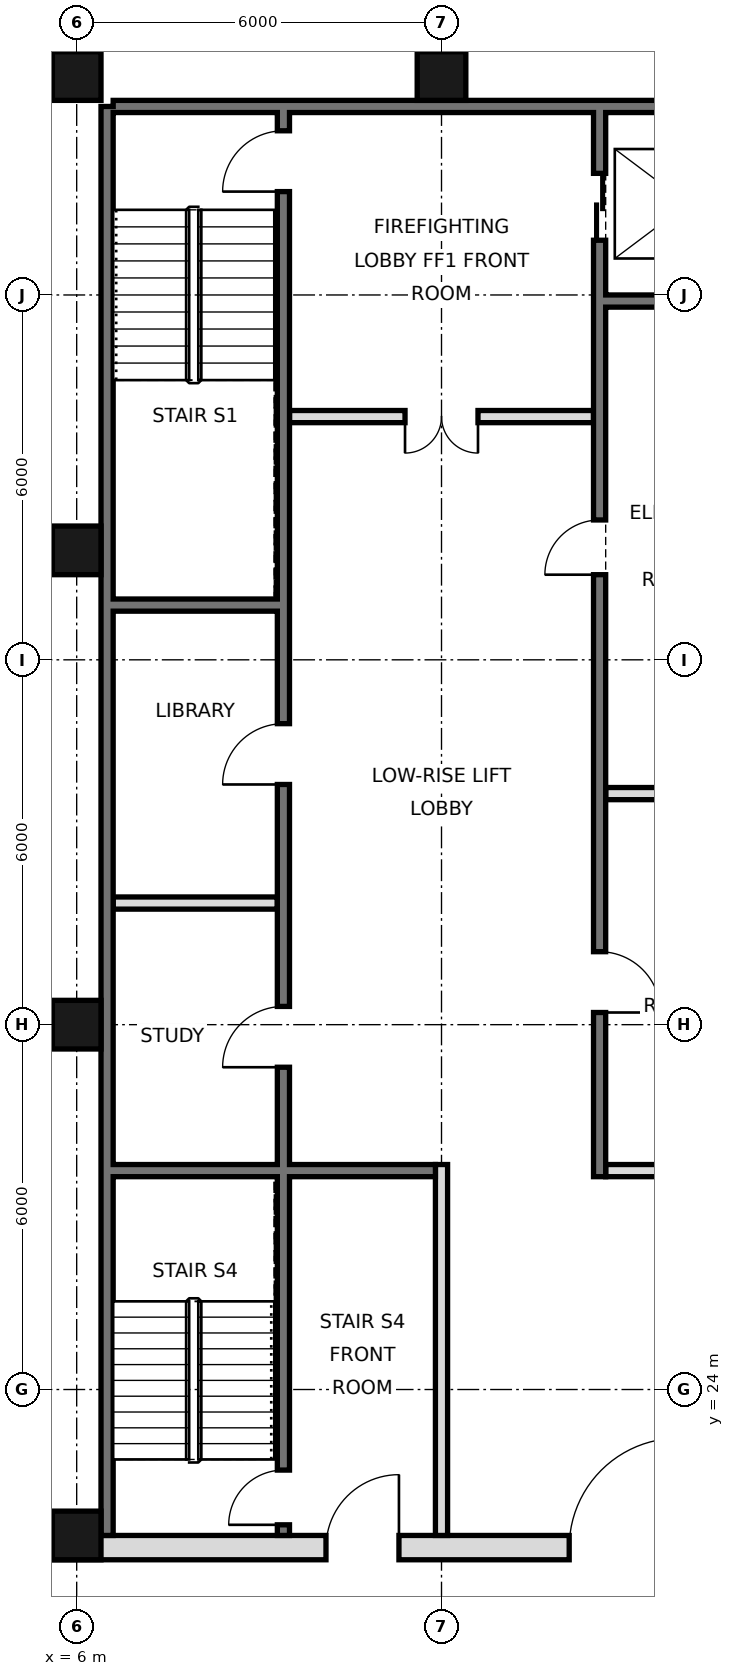
"""IFC4 building model, lengths in metres.
Left out: names, types, materials, properties, quantities, classifications, styles, units other than length and angle.
Written with IfcOpenShell. Run it as: python <this file> out.ifc"""

import sys

from ifc_helpers import new_model, si_unit, direction, frame, frame_2d, origin, origin_2d, place, context, subcontext, project, spatial, rectangle, hollow_rectangle, extrude, element, fill, save


model = new_model("IFC4")
c1 = context("Model", 3, precision=1e-05, world=origin(), true_north=direction((0.0, 1.0)))
c2 = subcontext(c1, "Body", "Model", "MODEL_VIEW")
j1 = project(units=[si_unit("LENGTHUNIT", "METRE"), si_unit("PLANEANGLEUNIT", "RADIAN")], contexts=[c1])
p1 = place(None, origin())
s1 = spatial("IfcSite", under=j1, at=p1, CompositionType="ELEMENT")
p2 = place(p1, origin())
s2 = spatial("IfcBuilding", under=s1, at=p2, CompositionType="ELEMENT")
p3 = place(p2, frame((0.0, 0.0, 219.0)))
s3 = spatial("IfcBuildingStorey", under=s2, at=p3, CompositionType="ELEMENT", Elevation=219.0)
for number, where, z_axis, x_axis in (
    (1, (6.0, 21.6, 0.0), (0.0, 0.0, 1.0), (1.0, 0.0, 0.0)),
    (2, (6.0, 30.0, 0.0), (0.0, 0.0, 1.0), (1.0, 0.0, 0.0)),
    (3, (6.0, 37.8, 0.0), (0.0, 0.0, 1.0), (1.0, 0.0, 0.0)),
    (4, (6.0, 45.6, 0.0), (0.0, 0.0, 1.0), (1.0, 0.0, 0.0)),
    (5, (12.0, 45.6, 0.0), (0.0, 0.0, 1.0), (1.0, 0.0, 0.0)),
):
    element("IfcColumn", number, at=place(p3, frame(where, z_axis=z_axis, x_axis=x_axis)), inside=s3, PredefinedType="COLUMN", context=c2, shape_type="SweptSolid", body=[
        extrude(hollow_rectangle(XDim=0.8, YDim=0.8, WallThickness=0.04, at=origin_2d()), origin(), (0.0, 0.0, 1.0), 3.6),
    ])
p4 = place(p3, frame((6.5, 21.6, 0.0), z_axis=(0.0, 0.0, 1.0), x_axis=(0.0, 1.0, 0.0)))
e6 = element("IfcWall", 6, at=p4, inside=s3, PredefinedType="SOLIDWALL", context=c2, shape_type="SweptSolid", body=[
    extrude(rectangle(XDim=23.5, YDim=0.2, at=frame_2d((11.75, 0.0))), origin(), (0.0, 0.0, 1.0), 3.42),
])
p5 = place(p3, frame((6.6, 45.1, 0.0), z_axis=(0.0, 0.0, 1.0), x_axis=(1.0, 0.0, 0.0)))
e7 = element("IfcWall", 7, at=p5, inside=s3, PredefinedType="SOLIDWALL", context=c2, shape_type="SweptSolid", body=[
    extrude(rectangle(XDim=34.8, YDim=0.2, at=frame_2d((17.4, 0.0))), origin(), (0.0, 0.0, 1.0), 3.42),
])
p6 = place(p3, frame((5.6, 21.4, 0.0), z_axis=(0.0, 0.0, 1.0), x_axis=(1.0, 0.0, 0.0)))
e8 = element("IfcWall", 8, at=p6, inside=s3, PredefinedType="SOLIDWALL", context=c2, shape_type="SweptSolid", body=[
    extrude(rectangle(XDim=36.8, YDim=0.4, at=frame_2d((18.4, 0.0))), origin(), (0.0, 0.0, 1.0), 3.42),
])
p7 = place(p6, frame((8.5, 0.0, 0.0)))
e9 = element("IfcOpeningElement", 9, at=p7, cuts=e8, PredefinedType="OPENING", context=c2, shape_type="SweptSolid", body=[
    extrude(rectangle(XDim=1.8, YDim=2.1, at=frame_2d((0.9, 1.05))), frame((0.0, 0.21, 0.0), z_axis=(0.0, -1.0, 0.0), x_axis=(1.0, 0.0, 0.0)), (0.0, 0.0, 1.0), 0.42),
])
p8 = place(p6, frame((17.5, 0.0, 0.0)))
e10 = element("IfcOpeningElement", 10, at=p8, cuts=e8, PredefinedType="OPENING", context=c2, shape_type="SweptSolid", body=[
    extrude(rectangle(XDim=1.8, YDim=2.1, at=frame_2d((0.9, 1.05))), frame((0.0, 0.21, 0.0), z_axis=(0.0, -1.0, 0.0), x_axis=(1.0, 0.0, 0.0)), (0.0, 0.0, 1.0), 0.42),
])
p9 = place(p6, frame((26.5, 0.0, 0.0)))
e11 = element("IfcOpeningElement", 11, at=p9, cuts=e8, PredefinedType="OPENING", context=c2, shape_type="SweptSolid", body=[
    extrude(rectangle(XDim=1.8, YDim=2.1, at=frame_2d((0.9, 1.05))), frame((0.0, 0.21, 0.0), z_axis=(0.0, -1.0, 0.0), x_axis=(1.0, 0.0, 0.0)), (0.0, 0.0, 1.0), 0.42),
])
p10 = place(p6, frame((4.5, 0.0, 0.0)))
e12 = element("IfcOpeningElement", 12, at=p10, cuts=e8, PredefinedType="OPENING", context=c2, shape_type="SweptSolid", body=[
    extrude(rectangle(XDim=1.2, YDim=2.1, at=frame_2d((0.6, 1.05))), frame((0.0, 0.21, 0.0), z_axis=(0.0, -1.0, 0.0), x_axis=(1.0, 0.0, 0.0)), (0.0, 0.0, 1.0), 0.42),
])
p11 = place(p6, frame((31.1, 0.0, 0.0)))
e13 = element("IfcOpeningElement", 13, at=p11, cuts=e8, PredefinedType="OPENING", context=c2, shape_type="SweptSolid", body=[
    extrude(rectangle(XDim=1.2, YDim=2.1, at=frame_2d((0.6, 1.05))), frame((0.0, 0.21, 0.0), z_axis=(0.0, -1.0, 0.0), x_axis=(1.0, 0.0, 0.0)), (0.0, 0.0, 1.0), 0.42),
])
p12 = place(p3, frame((12.0, 21.6, 0.0), z_axis=(0.0, 0.0, 1.0), x_axis=(0.0, 1.0, 0.0)))
e14 = element("IfcWall", 14, at=p12, inside=s3, PredefinedType="PARTITIONING", context=c2, shape_type="SweptSolid", body=[
    extrude(rectangle(XDim=6.1, YDim=0.2, at=frame_2d((3.05, 0.0))), origin(), (0.0, 0.0, 1.0), 3.42),
])
p13 = place(p3, frame((14.6, 27.5, 0.0), z_axis=(0.0, 0.0, 1.0), x_axis=(0.0, 1.0, 0.0)))
e15 = element("IfcWall", 15, at=p13, inside=s3, PredefinedType="SOLIDWALL", context=c2, shape_type="SweptSolid", body=[
    extrude(rectangle(XDim=17.5, YDim=0.2, at=frame_2d((8.75, 0.0))), origin(), (0.0, 0.0, 1.0), 3.42),
])
p14 = place(p13, frame((15.4, 0.0, 0.0)))
e16 = element("IfcOpeningElement", 16, at=p14, cuts=e15, PredefinedType="OPENING", context=c2, shape_type="SweptSolid", body=[
    extrude(rectangle(XDim=1.1, YDim=2.1, at=frame_2d((0.55, 1.05))), frame((0.0, 0.11, 0.0), z_axis=(0.0, -1.0, 0.0), x_axis=(1.0, 0.0, 0.0)), (0.0, 0.0, 1.0), 0.22),
])
p15 = place(p13, frame((2.7, 0.0, 0.0)))
e17 = element("IfcOpeningElement", 17, at=p15, cuts=e15, PredefinedType="OPENING", context=c2, shape_type="SweptSolid", body=[
    extrude(rectangle(XDim=1.0, YDim=2.1, at=frame_2d((0.5, 1.05))), frame((0.0, 0.11, 0.0), z_axis=(0.0, -1.0, 0.0), x_axis=(1.0, 0.0, 0.0)), (0.0, 0.0, 1.0), 0.22),
])
p16 = place(p13, frame((9.9, 0.0, 0.0)))
e18 = element("IfcOpeningElement", 18, at=p16, cuts=e15, PredefinedType="OPENING", context=c2, shape_type="SweptSolid", body=[
    extrude(rectangle(XDim=0.9, YDim=2.1, at=frame_2d((0.45, 1.05))), frame((0.0, 0.11, 0.0), z_axis=(0.0, -1.0, 0.0), x_axis=(1.0, 0.0, 0.0)), (0.0, 0.0, 1.0), 0.22),
])
p17 = place(p3, frame((9.4, 21.6, 0.0), z_axis=(0.0, 0.0, 1.0), x_axis=(0.0, 1.0, 0.0)))
e19 = element("IfcWall", 19, at=p17, inside=s3, PredefinedType="SOLIDWALL", context=c2, shape_type="SweptSolid", body=[
    extrude(rectangle(XDim=23.4, YDim=0.2, at=frame_2d((11.7, 0.0))), origin(), (0.0, 0.0, 1.0), 3.42),
])
p18 = place(p17, frame((7.7, 0.0, 0.0)))
e20 = element("IfcOpeningElement", 20, at=p18, cuts=e19, PredefinedType="OPENING", context=c2, shape_type="SweptSolid", body=[
    extrude(rectangle(XDim=1.0, YDim=2.1, at=frame_2d((0.5, 1.05))), frame((0.0, 0.11, 0.0), z_axis=(0.0, -1.0, 0.0), x_axis=(1.0, 0.0, 0.0)), (0.0, 0.0, 1.0), 0.22),
])
p19 = place(p17, frame((12.35, 0.0, 0.0)))
e21 = element("IfcOpeningElement", 21, at=p19, cuts=e19, PredefinedType="OPENING", context=c2, shape_type="SweptSolid", body=[
    extrude(rectangle(XDim=1.0, YDim=2.1, at=frame_2d((0.5, 1.05))), frame((0.0, 0.11, 0.0), z_axis=(0.0, -1.0, 0.0), x_axis=(1.0, 0.0, 0.0)), (0.0, 0.0, 1.0), 0.22),
])
p20 = place(p17, frame((22.1, 0.0, 0.0)))
e22 = element("IfcOpeningElement", 22, at=p20, cuts=e19, PredefinedType="OPENING", context=c2, shape_type="SweptSolid", body=[
    extrude(rectangle(XDim=1.0, YDim=2.1, at=frame_2d((0.5, 1.05))), frame((0.0, 0.11, 0.0), z_axis=(0.0, -1.0, 0.0), x_axis=(1.0, 0.0, 0.0)), (0.0, 0.0, 1.0), 0.22),
])
p21 = place(p17, frame((0.175, 0.0, 0.0)))
e23 = element("IfcOpeningElement", 23, at=p21, cuts=e19, PredefinedType="OPENING", context=c2, shape_type="SweptSolid", body=[
    extrude(rectangle(XDim=0.9, YDim=2.1, at=frame_2d((0.45, 1.05))), frame((0.0, 0.11, 0.0), z_axis=(0.0, -1.0, 0.0), x_axis=(1.0, 0.0, 0.0)), (0.0, 0.0, 1.0), 0.22),
])
p22 = place(p3, frame((14.7, 27.6, 0.0), z_axis=(0.0, 0.0, 1.0), x_axis=(1.0, 0.0, 0.0)))
e24 = element("IfcWall", 24, at=p22, inside=s3, PredefinedType="PARTITIONING", context=c2, shape_type="SweptSolid", body=[
    extrude(rectangle(XDim=2.7, YDim=0.2, at=frame_2d((1.35, 0.0))), origin(), (0.0, 0.0, 1.0), 3.42),
])
p23 = place(p3, frame((6.6, 27.6, 0.0), z_axis=(0.0, 0.0, 1.0), x_axis=(1.0, 0.0, 0.0)))
e25 = element("IfcWall", 25, at=p23, inside=s3, PredefinedType="SOLIDWALL", context=c2, shape_type="SweptSolid", body=[
    extrude(rectangle(XDim=5.3, YDim=0.2, at=frame_2d((2.65, 0.0))), origin(), (0.0, 0.0, 1.0), 3.42),
])
p24 = place(p3, frame((6.6, 32.0, 0.0), z_axis=(0.0, 0.0, 1.0), x_axis=(1.0, 0.0, 0.0)))
e26 = element("IfcWall", 26, at=p24, inside=s3, PredefinedType="PARTITIONING", context=c2, shape_type="SweptSolid", body=[
    extrude(rectangle(XDim=2.7, YDim=0.2, at=frame_2d((1.35, 0.0))), origin(), (0.0, 0.0, 1.0), 3.42),
])
for number, where, z_axis, x_axis in (
    (27, (14.7, 33.8, 0.0), (0.0, 0.0, 1.0), (1.0, 0.0, 0.0)),
    (28, (6.6, 36.9, 0.0), (0.0, 0.0, 1.0), (1.0, 0.0, 0.0)),
):
    element("IfcWall", number, at=place(p3, frame(where, z_axis=z_axis, x_axis=x_axis)), inside=s3, PredefinedType="SOLIDWALL", context=c2, shape_type="SweptSolid", body=[
        extrude(rectangle(XDim=2.7, YDim=0.2, at=frame_2d((1.35, 0.0))), origin(), (0.0, 0.0, 1.0), 3.42),
    ])
p25 = place(p3, frame((9.5, 40.0, 0.0), z_axis=(0.0, 0.0, 1.0), x_axis=(1.0, 0.0, 0.0)))
e29 = element("IfcWall", 29, at=p25, inside=s3, PredefinedType="PARTITIONING", context=c2, shape_type="SweptSolid", body=[
    extrude(rectangle(XDim=5.0, YDim=0.2, at=frame_2d((2.5, 0.0))), origin(), (0.0, 0.0, 1.0), 3.42),
])
p26 = place(p25, frame((1.9, 0.0, 0.0)))
e30 = element("IfcOpeningElement", 30, at=p26, cuts=e29, PredefinedType="OPENING", context=c2, shape_type="SweptSolid", body=[
    extrude(rectangle(XDim=1.2, YDim=2.1, at=frame_2d((0.6, 1.05))), frame((0.0, 0.11, 0.0), z_axis=(0.0, -1.0, 0.0), x_axis=(1.0, 0.0, 0.0)), (0.0, 0.0, 1.0), 0.22),
])
p27 = place(p3, frame((14.7, 41.9, 0.0), z_axis=(0.0, 0.0, 1.0), x_axis=(1.0, 0.0, 0.0)))
e31 = element("IfcWall", 31, at=p27, inside=s3, PredefinedType="SOLIDWALL", context=c2, shape_type="SweptSolid", body=[
    extrude(rectangle(XDim=2.7, YDim=0.2, at=frame_2d((1.35, 0.0))), origin(), (0.0, 0.0, 1.0), 3.42),
])
p28 = place(p7, frame((1.8, 0.0, 0.0), z_axis=(0.0, 0.0, 1.0), x_axis=(-1.0, 0.0, 0.0)))
e32 = element("IfcDoor", 32, at=p28, inside=s3, OperationType="SINGLE_SWING_LEFT", PredefinedType="DOOR", context=c2, shape_type="SweptSolid", body=[
    extrude(rectangle(XDim=1.8, YDim=2.1, at=frame_2d((0.9, 1.05))), frame((0.0, 0.025, 0.0), z_axis=(0.0, -1.0, 0.0), x_axis=(1.0, 0.0, 0.0)), (0.0, 0.0, 1.0), 0.05),
])
fill(e9, e32)
p29 = place(p10, frame((1.2, 0.0, 0.0), z_axis=(0.0, 0.0, 1.0), x_axis=(-1.0, 0.0, 0.0)))
e33 = element("IfcDoor", 33, at=p29, inside=s3, OperationType="SINGLE_SWING_LEFT", PredefinedType="DOOR", context=c2, shape_type="SweptSolid", body=[
    extrude(rectangle(XDim=1.2, YDim=2.1, at=frame_2d((0.6, 1.05))), frame((0.0, 0.025, 0.0), z_axis=(0.0, -1.0, 0.0), x_axis=(1.0, 0.0, 0.0)), (0.0, 0.0, 1.0), 0.05),
])
fill(e12, e33)
p30 = place(p26, frame((1.2, 0.0, 0.0), z_axis=(0.0, 0.0, 1.0), x_axis=(-1.0, 0.0, 0.0)))
e34 = element("IfcDoor", 34, at=p30, inside=s3, OperationType="DOUBLE_DOOR_SINGLE_SWING", PredefinedType="DOOR", context=c2, shape_type="SweptSolid", body=[
    extrude(rectangle(XDim=1.2, YDim=2.1, at=frame_2d((0.6, 1.05))), frame((0.0, 0.025, 0.0), z_axis=(0.0, -1.0, 0.0), x_axis=(1.0, 0.0, 0.0)), (0.0, 0.0, 1.0), 0.05),
])
fill(e30, e34)
p31 = place(p14, origin())
e35 = element("IfcDoor", 35, at=p31, inside=s3, OperationType="DOUBLE_DOOR_SLIDING", PredefinedType="DOOR", context=c2, shape_type="SweptSolid", body=[
    extrude(rectangle(XDim=1.1, YDim=2.1, at=frame_2d((0.55, 1.05))), frame((0.0, 0.025, 0.0), z_axis=(0.0, -1.0, 0.0), x_axis=(1.0, 0.0, 0.0)), (0.0, 0.0, 1.0), 0.05),
])
fill(e16, e35)
p32 = place(p15, frame((1.0, 0.0, 0.0), z_axis=(0.0, 0.0, 1.0), x_axis=(-1.0, 0.0, 0.0)))
e36 = element("IfcDoor", 36, at=p32, inside=s3, OperationType="SINGLE_SWING_RIGHT", PredefinedType="DOOR", context=c2, shape_type="SweptSolid", body=[
    extrude(rectangle(XDim=1.0, YDim=2.1, at=frame_2d((0.5, 1.05))), frame((0.0, 0.025, 0.0), z_axis=(0.0, -1.0, 0.0), x_axis=(1.0, 0.0, 0.0)), (0.0, 0.0, 1.0), 0.05),
])
fill(e17, e36)
p33 = place(p18, origin())
e37 = element("IfcDoor", 37, at=p33, inside=s3, OperationType="SINGLE_SWING_LEFT", PredefinedType="DOOR", context=c2, shape_type="SweptSolid", body=[
    extrude(rectangle(XDim=1.0, YDim=2.1, at=frame_2d((0.5, 1.05))), frame((0.0, 0.025, 0.0), z_axis=(0.0, -1.0, 0.0), x_axis=(1.0, 0.0, 0.0)), (0.0, 0.0, 1.0), 0.05),
])
fill(e20, e37)
p34 = place(p19, origin())
e38 = element("IfcDoor", 38, at=p34, inside=s3, OperationType="SINGLE_SWING_LEFT", PredefinedType="DOOR", context=c2, shape_type="SweptSolid", body=[
    extrude(rectangle(XDim=1.0, YDim=2.1, at=frame_2d((0.5, 1.05))), frame((0.0, 0.025, 0.0), z_axis=(0.0, -1.0, 0.0), x_axis=(1.0, 0.0, 0.0)), (0.0, 0.0, 1.0), 0.05),
])
fill(e21, e38)
p35 = place(p20, origin())
e39 = element("IfcDoor", 39, at=p35, inside=s3, OperationType="SINGLE_SWING_LEFT", PredefinedType="DOOR", context=c2, shape_type="SweptSolid", body=[
    extrude(rectangle(XDim=1.0, YDim=2.1, at=frame_2d((0.5, 1.05))), frame((0.0, 0.025, 0.0), z_axis=(0.0, -1.0, 0.0), x_axis=(1.0, 0.0, 0.0)), (0.0, 0.0, 1.0), 0.05),
])
fill(e22, e39)
p36 = place(p21, origin())
e40 = element("IfcDoor", 40, at=p36, inside=s3, OperationType="SINGLE_SWING_LEFT", PredefinedType="DOOR", context=c2, shape_type="SweptSolid", body=[
    extrude(rectangle(XDim=0.9, YDim=2.1, at=frame_2d((0.45, 1.05))), frame((0.0, 0.025, 0.0), z_axis=(0.0, -1.0, 0.0), x_axis=(1.0, 0.0, 0.0)), (0.0, 0.0, 1.0), 0.05),
])
fill(e23, e40)
p37 = place(p16, origin())
e41 = element("IfcDoor", 41, at=p37, inside=s3, OperationType="SINGLE_SWING_LEFT", PredefinedType="DOOR", context=c2, shape_type="SweptSolid", body=[
    extrude(rectangle(XDim=0.9, YDim=2.1, at=frame_2d((0.45, 1.05))), frame((0.0, 0.025, 0.0), z_axis=(0.0, -1.0, 0.0), x_axis=(1.0, 0.0, 0.0)), (0.0, 0.0, 1.0), 0.05),
])
fill(e18, e41)
save(model, sys.argv[1])
